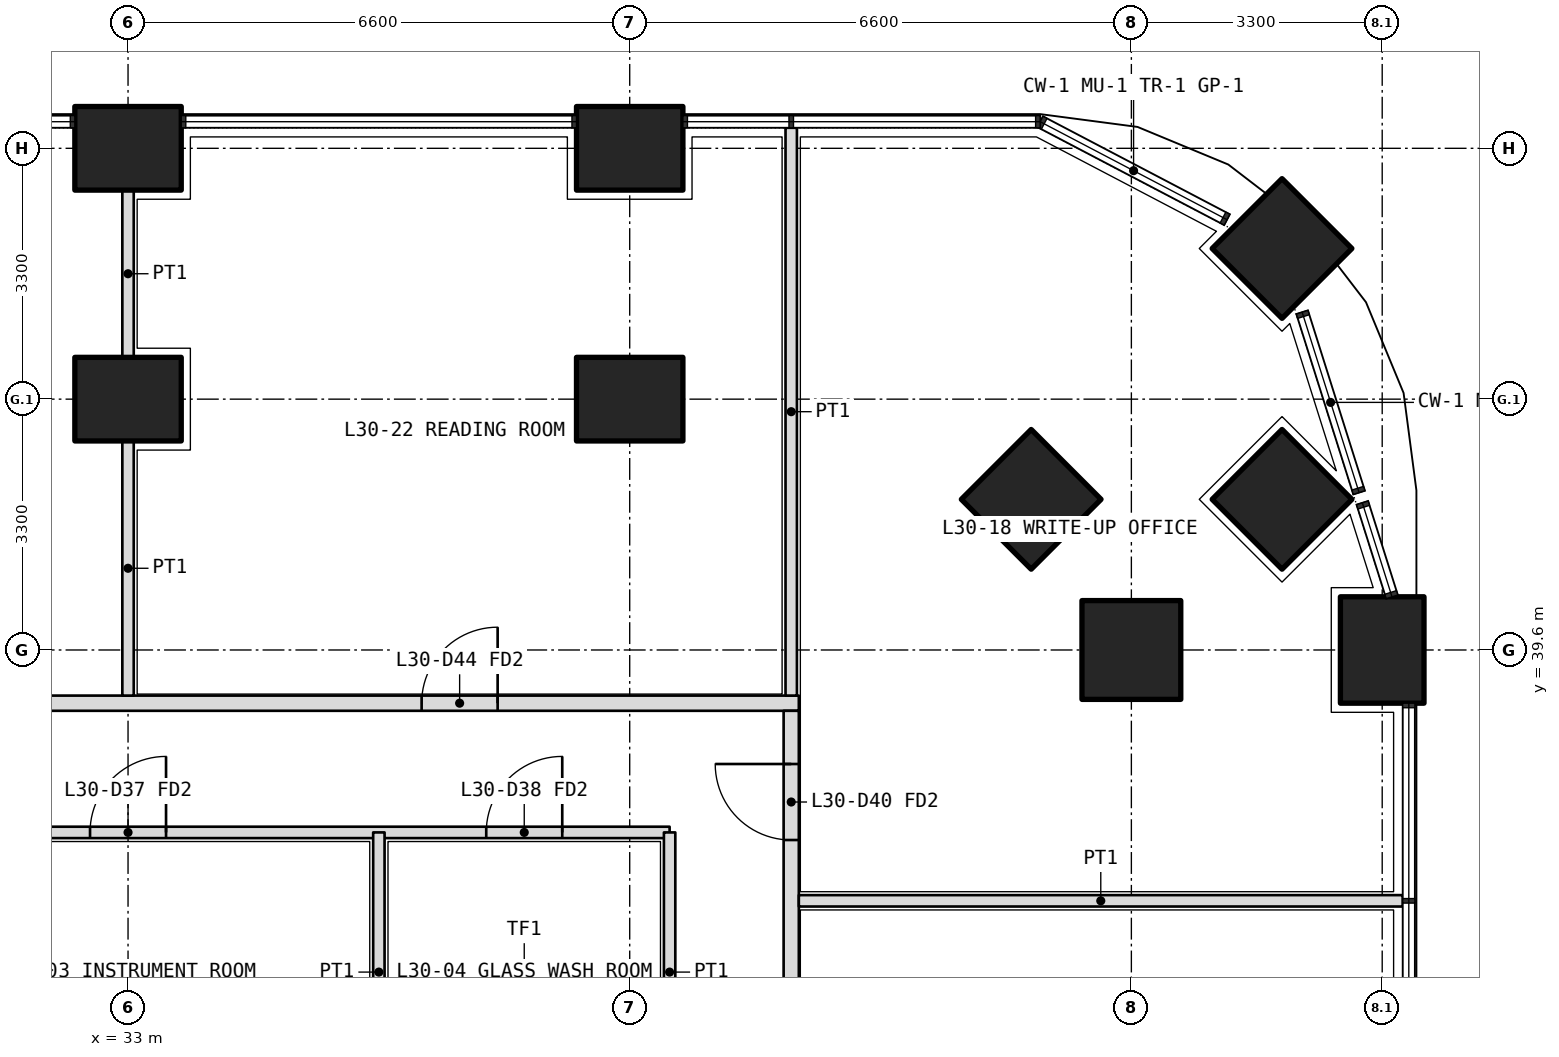
"""IFC4 building model, lengths in metres.
Left out: names, types, materials, properties, quantities, classifications, styles, units other than length and angle.
Written with IfcOpenShell. Run it as: python <this file> out.ifc"""

import sys

from ifc_helpers import new_model, si_unit, direction, frame, frame_2d, origin, origin_2d, place, context, subcontext, project, spatial, rectangle, extrude, element, fill, save


model = new_model("IFC4")
c1 = context("Model", 3, precision=1e-05, world=origin(), true_north=direction((0.0, 1.0)))
c2 = subcontext(c1, "Body", "Model", "MODEL_VIEW")
j1 = project(units=[si_unit("LENGTHUNIT", "METRE"), si_unit("PLANEANGLEUNIT", "RADIAN")], contexts=[c1])
p1 = place(None, origin())
s1 = spatial("IfcSite", under=j1, at=p1, CompositionType="ELEMENT")
p2 = place(p1, origin())
s2 = spatial("IfcBuilding", under=s1, at=p2, CompositionType="ELEMENT")
p3 = place(p2, frame((0.0, 0.0, 132.6)))
s3 = spatial("IfcBuildingStorey", under=s2, at=p3, CompositionType="ELEMENT", Elevation=132.6)
p4 = place(p3, frame((48.182, 44.882, 0.0), z_axis=(0.0, 0.0, 1.0), x_axis=(0.707106781187, 0.707106781187, 0.0)))
e1 = element("IfcColumn", 1, at=p4, inside=s3, PredefinedType="COLUMN", context=c2, shape_type="SweptSolid", body=[
    extrude(rectangle(XDim=1.3, YDim=1.3, at=origin_2d()), origin(), (0.0, 0.0, 1.0), 4.2),
])
for number, where, z_axis, x_axis in (
    (2, (49.5, 39.6, 0.0), (0.0, 0.0, 1.0), (0.0, 1.0, 0.0)),
    (3, (33.0, 46.2, 0.0), (0.0, 0.0, 1.0), (1.0, 0.0, 0.0)),
    (4, (39.6, 46.2, 0.0), (0.0, 0.0, 1.0), (1.0, 0.0, 0.0)),
):
    element("IfcColumn", number, at=place(p3, frame(where, z_axis=z_axis, x_axis=x_axis)), inside=s3, PredefinedType="COLUMN", context=c2, shape_type="SweptSolid", body=[
        extrude(rectangle(XDim=1.4, YDim=1.1, at=origin_2d()), origin(), (0.0, 0.0, 1.0), 4.2),
    ])
for number, where, z_axis, x_axis in (
    (5, (46.2, 39.6, 0.0), (0.0, 0.0, 1.0), (1.0, 0.0, 0.0)),
    (6, (48.182, 41.582, 0.0), (0.0, 0.0, 1.0), (0.707, 0.707, 0.0)),
):
    element("IfcColumn", number, at=place(p3, frame(where, z_axis=z_axis, x_axis=x_axis)), inside=s3, PredefinedType="COLUMN", context=c2, shape_type="SweptSolid", body=[
        extrude(rectangle(XDim=1.3, YDim=1.3, at=origin_2d()), origin(), (0.0, 0.0, 1.0), 4.2),
    ])
for number, where, z_axis, x_axis in (
    (7, (33.0, 42.9, 0.0), (0.0, 0.0, 1.0), (1.0, 0.0, 0.0)),
    (8, (39.6, 42.9, 0.0), (0.0, 0.0, 1.0), (1.0, 0.0, 0.0)),
):
    element("IfcColumn", number, at=place(p3, frame(where, z_axis=z_axis, x_axis=x_axis)), inside=s3, PredefinedType="COLUMN", context=c2, shape_type="SweptSolid", body=[
        extrude(rectangle(XDim=1.4, YDim=1.1, at=origin_2d()), origin(), (0.0, 0.0, 1.0), 4.2),
    ])
p5 = place(p3, frame((44.882, 41.582, 0.0), z_axis=(0.0, 0.0, 1.0), x_axis=(0.707106781187, 0.707106781187, 0.0)))
e9 = element("IfcColumn", 9, at=p5, inside=s3, PredefinedType="COLUMN", context=c2, shape_type="SweptSolid", body=[
    extrude(rectangle(XDim=1.3, YDim=1.3, at=origin_2d()), origin(), (0.0, 0.0, 1.0), 4.2),
])
p6 = place(p3, frame((12.675, 37.2, 0.0), z_axis=(0.0, 0.0, 1.0), x_axis=(1.0, 0.0, 0.0)))
e10 = element("IfcWall", 10, at=p6, inside=s3, PredefinedType="PARTITIONING", context=c2, shape_type="SweptSolid", body=[
    extrude(rectangle(XDim=27.45, YDim=0.15, at=frame_2d((13.725, 0.0))), origin(), (0.0, 0.0, 1.0), 2.85),
])
p7 = place(p6, frame((3.062, 0.0, 0.0)))
e11 = element("IfcOpeningElement", 11, at=p7, cuts=e10, PredefinedType="OPENING", context=c2, shape_type="SweptSolid", body=[
    extrude(rectangle(XDim=1.0, YDim=2.1, at=frame_2d((0.5, 1.05))), frame((0.0, 0.085, 0.0), z_axis=(0.0, -1.0, 0.0), x_axis=(1.0, 0.0, 0.0)), (0.0, 0.0, 1.0), 0.17),
])
p8 = place(p6, frame((11.575, 0.0, 0.0)))
e12 = element("IfcOpeningElement", 12, at=p8, cuts=e10, PredefinedType="OPENING", context=c2, shape_type="SweptSolid", body=[
    extrude(rectangle(XDim=1.0, YDim=2.1, at=frame_2d((0.5, 1.05))), frame((0.0, 0.085, 0.0), z_axis=(0.0, -1.0, 0.0), x_axis=(1.0, 0.0, 0.0)), (0.0, 0.0, 1.0), 0.17),
])
p9 = place(p6, frame((19.825, 0.0, 0.0)))
e13 = element("IfcOpeningElement", 13, at=p9, cuts=e10, PredefinedType="OPENING", context=c2, shape_type="SweptSolid", body=[
    extrude(rectangle(XDim=1.0, YDim=2.1, at=frame_2d((0.5, 1.05))), frame((0.0, 0.085, 0.0), z_axis=(0.0, -1.0, 0.0), x_axis=(1.0, 0.0, 0.0)), (0.0, 0.0, 1.0), 0.17),
])
p10 = place(p6, frame((25.038, 0.0, 0.0)))
e14 = element("IfcOpeningElement", 14, at=p10, cuts=e10, PredefinedType="OPENING", context=c2, shape_type="SweptSolid", body=[
    extrude(rectangle(XDim=1.0, YDim=2.1, at=frame_2d((0.5, 1.05))), frame((0.0, 0.085, 0.0), z_axis=(0.0, -1.0, 0.0), x_axis=(1.0, 0.0, 0.0)), (0.0, 0.0, 1.0), 0.17),
])
p11 = place(p3, frame((40.125, 33.525, 0.0), z_axis=(0.0, 0.0, 1.0), x_axis=(0.0, 1.0, 0.0)))
e15 = element("IfcWall", 15, at=p11, inside=s3, PredefinedType="PARTITIONING", context=c2, shape_type="SweptSolid", body=[
    extrude(rectangle(XDim=3.675, YDim=0.15, at=frame_2d((1.837, 0.0))), origin(), (0.0, 0.0, 1.0), 2.85),
])
p12 = place(p3, frame((36.3, 33.525, 0.0), z_axis=(0.0, 0.0, 1.0), x_axis=(0.0, 1.0, 0.0)))
e16 = element("IfcWall", 16, at=p12, inside=s3, PredefinedType="PARTITIONING", context=c2, shape_type="SweptSolid", body=[
    extrude(rectangle(XDim=3.675, YDim=0.15, at=frame_2d((1.837, 0.0))), origin(), (0.0, 0.0, 1.0), 3.9),
])
p13 = place(p3, frame((10.975, 38.9, 0.0), z_axis=(0.0, 0.0, 1.0), x_axis=(1.0, 0.0, 0.0)))
e17 = element("IfcWall", 17, at=p13, inside=s3, PredefinedType="PARTITIONING", context=c2, shape_type="SweptSolid", body=[
    extrude(rectangle(XDim=30.85, YDim=0.2, at=frame_2d((15.425, 0.0))), origin(), (0.0, 0.0, 1.0), 2.85),
])
p14 = place(p13, frame((0.562, 0.0, 0.0)))
e18 = element("IfcOpeningElement", 18, at=p14, cuts=e17, PredefinedType="OPENING", context=c2, shape_type="SweptSolid", body=[
    extrude(rectangle(XDim=1.2, YDim=2.1, at=frame_2d((0.6, 1.05))), frame((0.0, 0.11, 0.0), z_axis=(0.0, -1.0, 0.0), x_axis=(1.0, 0.0, 0.0)), (0.0, 0.0, 1.0), 0.22),
])
p15 = place(p13, frame((6.675, 0.0, 0.0)))
e19 = element("IfcOpeningElement", 19, at=p15, cuts=e17, PredefinedType="OPENING", context=c2, shape_type="SweptSolid", body=[
    extrude(rectangle(XDim=1.0, YDim=2.1, at=frame_2d((0.5, 1.05))), frame((0.0, 0.11, 0.0), z_axis=(0.0, -1.0, 0.0), x_axis=(1.0, 0.0, 0.0)), (0.0, 0.0, 1.0), 0.22),
])
p16 = place(p13, frame((16.575, 0.0, 0.0)))
e20 = element("IfcOpeningElement", 20, at=p16, cuts=e17, PredefinedType="OPENING", context=c2, shape_type="SweptSolid", body=[
    extrude(rectangle(XDim=1.0, YDim=2.1, at=frame_2d((0.5, 1.05))), frame((0.0, 0.11, 0.0), z_axis=(0.0, -1.0, 0.0), x_axis=(1.0, 0.0, 0.0)), (0.0, 0.0, 1.0), 0.22),
])
p17 = place(p13, frame((25.887, 0.0, 0.0)))
e21 = element("IfcOpeningElement", 21, at=p17, cuts=e17, PredefinedType="OPENING", context=c2, shape_type="SweptSolid", body=[
    extrude(rectangle(XDim=1.0, YDim=2.1, at=frame_2d((0.5, 1.05))), frame((0.0, 0.11, 0.0), z_axis=(0.0, -1.0, 0.0), x_axis=(1.0, 0.0, 0.0)), (0.0, 0.0, 1.0), 0.22),
])
p18 = place(p3, frame((41.725, 11.175, 0.0), z_axis=(0.0, 0.0, 1.0), x_axis=(0.0, 1.0, 0.0)))
e22 = element("IfcWall", 22, at=p18, inside=s3, PredefinedType="PARTITIONING", context=c2, shape_type="SweptSolid", body=[
    extrude(rectangle(XDim=27.625, YDim=0.2, at=frame_2d((13.812, 0.0))), origin(), (0.0, 0.0, 1.0), 2.85),
])
p19 = place(p18, frame((3.762, 0.0, 0.0)))
e23 = element("IfcOpeningElement", 23, at=p19, cuts=e22, PredefinedType="OPENING", context=c2, shape_type="SweptSolid", body=[
    extrude(rectangle(XDim=1.0, YDim=2.1, at=frame_2d((0.5, 1.05))), frame((0.0, 0.11, 0.0), z_axis=(0.0, -1.0, 0.0), x_axis=(1.0, 0.0, 0.0)), (0.0, 0.0, 1.0), 0.22),
])
p20 = place(p18, frame((9.625, 0.0, 0.0)))
e24 = element("IfcOpeningElement", 24, at=p20, cuts=e22, PredefinedType="OPENING", context=c2, shape_type="SweptSolid", body=[
    extrude(rectangle(XDim=1.0, YDim=2.1, at=frame_2d((0.5, 1.05))), frame((0.0, 0.11, 0.0), z_axis=(0.0, -1.0, 0.0), x_axis=(1.0, 0.0, 0.0)), (0.0, 0.0, 1.0), 0.22),
])
p21 = place(p18, frame((12.975, 0.0, 0.0)))
e25 = element("IfcOpeningElement", 25, at=p21, cuts=e22, PredefinedType="OPENING", context=c2, shape_type="SweptSolid", body=[
    extrude(rectangle(XDim=0.9, YDim=2.1, at=frame_2d((0.45, 1.05))), frame((0.0, 0.11, 0.0), z_axis=(0.0, -1.0, 0.0), x_axis=(1.0, 0.0, 0.0)), (0.0, 0.0, 1.0), 0.22),
])
p22 = place(p18, frame((19.675, 0.0, 0.0)))
e26 = element("IfcOpeningElement", 26, at=p22, cuts=e22, PredefinedType="OPENING", context=c2, shape_type="SweptSolid", body=[
    extrude(rectangle(XDim=1.0, YDim=2.1, at=frame_2d((0.5, 1.05))), frame((0.0, 0.11, 0.0), z_axis=(0.0, -1.0, 0.0), x_axis=(1.0, 0.0, 0.0)), (0.0, 0.0, 1.0), 0.22),
])
p23 = place(p18, frame((25.925, 0.0, 0.0)))
e27 = element("IfcOpeningElement", 27, at=p23, cuts=e22, PredefinedType="OPENING", context=c2, shape_type="SweptSolid", body=[
    extrude(rectangle(XDim=1.0, YDim=2.1, at=frame_2d((0.5, 1.05))), frame((0.0, 0.11, 0.0), z_axis=(0.0, -1.0, 0.0), x_axis=(1.0, 0.0, 0.0)), (0.0, 0.0, 1.0), 0.22),
])
p24 = place(p3, frame((41.725, 46.47, 0.0), z_axis=(0.0, 0.0, 1.0), x_axis=(0.0, -1.0, 0.0)))
e28 = element("IfcWall", 28, at=p24, inside=s3, PredefinedType="PARTITIONING", context=c2, shape_type="SweptSolid", body=[
    extrude(rectangle(XDim=7.47, YDim=0.15, at=frame_2d((3.735, 0.0))), origin(), (0.0, 0.0, 1.0), 2.7),
])
p25 = place(p3, frame((49.77, 36.3, 0.0), z_axis=(0.0, 0.0, 1.0), x_axis=(-1.0, 0.0, 0.0)))
e29 = element("IfcWall", 29, at=p25, inside=s3, PredefinedType="PARTITIONING", context=c2, shape_type="SweptSolid", body=[
    extrude(rectangle(XDim=7.945, YDim=0.15, at=frame_2d((3.973, 0.0))), origin(), (0.0, 0.0, 1.0), 2.7),
])
p26 = place(p3, frame((33.0, 45.65, 0.0), z_axis=(0.0, 0.0, 1.0), x_axis=(0.0, -1.0, 0.0)))
e30 = element("IfcWall", 30, at=p26, inside=s3, PredefinedType="PARTITIONING", context=c2, shape_type="SweptSolid", body=[
    extrude(rectangle(XDim=2.2, YDim=0.15, at=frame_2d((1.1, 0.0))), origin(), (0.0, 0.0, 1.0), 2.85),
])
p27 = place(p3, frame((33.0, 42.35, 0.0), z_axis=(0.0, 0.0, 1.0), x_axis=(0.0, -1.0, 0.0)))
e31 = element("IfcWall", 31, at=p27, inside=s3, PredefinedType="PARTITIONING", context=c2, shape_type="SweptSolid", body=[
    extrude(rectangle(XDim=3.35, YDim=0.15, at=frame_2d((1.675, 0.0))), origin(), (0.0, 0.0, 1.0), 2.85),
])
p28 = place(p9, origin())
e32 = element("IfcDoor", 32, at=p28, inside=s3, OperationType="SINGLE_SWING_RIGHT", PredefinedType="DOOR", context=c2, shape_type="SweptSolid", body=[
    extrude(rectangle(XDim=1.0, YDim=2.1, at=frame_2d((0.5, 1.05))), frame((0.0, 0.025, 0.0), z_axis=(0.0, -1.0, 0.0), x_axis=(1.0, 0.0, 0.0)), (0.0, 0.0, 1.0), 0.05),
])
fill(e13, e32)
p29 = place(p10, origin())
e33 = element("IfcDoor", 33, at=p29, inside=s3, OperationType="SINGLE_SWING_RIGHT", PredefinedType="DOOR", context=c2, shape_type="SweptSolid", body=[
    extrude(rectangle(XDim=1.0, YDim=2.1, at=frame_2d((0.5, 1.05))), frame((0.0, 0.025, 0.0), z_axis=(0.0, -1.0, 0.0), x_axis=(1.0, 0.0, 0.0)), (0.0, 0.0, 1.0), 0.05),
])
fill(e14, e33)
p30 = place(p23, origin())
e34 = element("IfcDoor", 34, at=p30, inside=s3, OperationType="SINGLE_SWING_RIGHT", PredefinedType="DOOR", context=c2, shape_type="SweptSolid", body=[
    extrude(rectangle(XDim=1.0, YDim=2.1, at=frame_2d((0.5, 1.05))), frame((0.0, 0.025, 0.0), z_axis=(0.0, -1.0, 0.0), x_axis=(1.0, 0.0, 0.0)), (0.0, 0.0, 1.0), 0.05),
])
fill(e27, e34)
p31 = place(p17, origin())
e35 = element("IfcDoor", 35, at=p31, inside=s3, OperationType="SINGLE_SWING_RIGHT", PredefinedType="DOOR", context=c2, shape_type="SweptSolid", body=[
    extrude(rectangle(XDim=1.0, YDim=2.1, at=frame_2d((0.5, 1.05))), frame((0.0, 0.025, 0.0), z_axis=(0.0, -1.0, 0.0), x_axis=(1.0, 0.0, 0.0)), (0.0, 0.0, 1.0), 0.05),
])
fill(e21, e35)
save(model, sys.argv[1])
